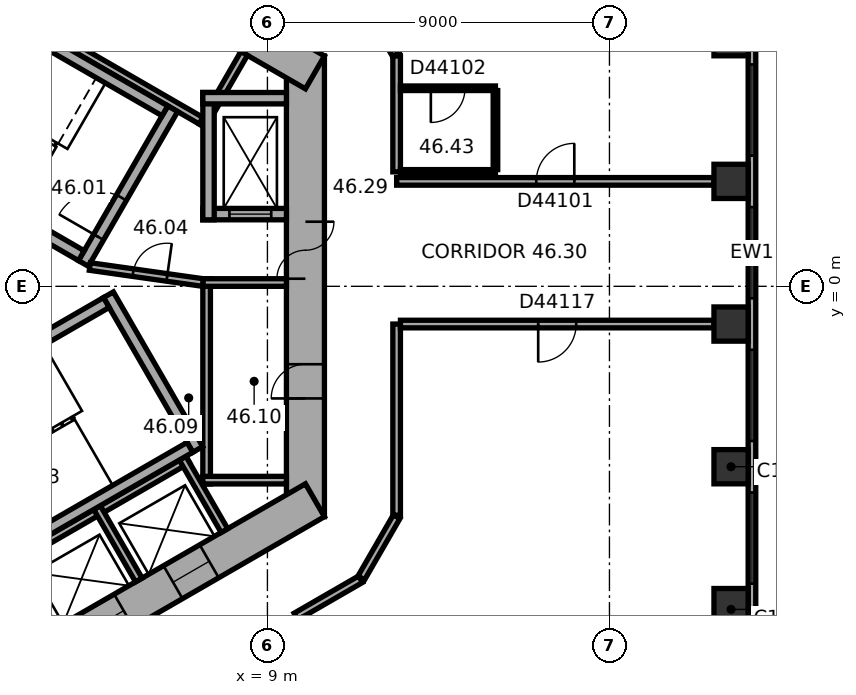
"""IFC4 building model, lengths in metres.
Left out: names, types, materials, properties, quantities, classifications, styles, units other than length and angle.
Written with IfcOpenShell. Run it as: python <this file> out.ifc"""

import sys

from ifc_helpers import new_model, si_unit, direction, frame, frame_2d, origin, origin_2d, place, context, subcontext, project, spatial, rectangle, extrude, element, fill, save


model = new_model("IFC4")
c1 = context("Model", 3, precision=1e-05, world=origin(), true_north=direction((0.0, 1.0)))
c2 = subcontext(c1, "Body", "Model", "MODEL_VIEW")
j1 = project(units=[si_unit("LENGTHUNIT", "METRE"), si_unit("PLANEANGLEUNIT", "RADIAN")], contexts=[c1])
p1 = place(None, origin())
s1 = spatial("IfcSite", under=j1, at=p1, CompositionType="ELEMENT")
p2 = place(p1, origin())
s2 = spatial("IfcBuilding", under=s1, at=p2, CompositionType="ELEMENT")
p3 = place(p2, frame((0.0, 0.0, 187.3)))
s3 = spatial("IfcBuildingStorey", under=s2, at=p3, CompositionType="ELEMENT", Elevation=187.3)
p4 = place(p3, frame((21.2, -8.501, 0.0), z_axis=(0.0, 0.0, 1.0), x_axis=(0.0, 1.0, 0.0)))
e1 = element("IfcColumn", 1, at=p4, inside=s3, PredefinedType="COLUMN", context=c2, shape_type="SweptSolid", body=[
    extrude(rectangle(XDim=1.1, YDim=0.9, at=origin_2d()), origin(), (0.0, 0.0, 1.0), 3.7),
])
for number, where, z_axis, x_axis in (
    (2, (21.2, -4.747, 0.0), (0.0, 0.0, 1.0), (0.0, 1.0, 0.0)),
    (3, (21.2, -0.993, 0.0), (0.0, 0.0, 1.0), (0.0, 1.0, 0.0)),
    (4, (21.2, 2.761, 0.0), (0.0, 0.0, 1.0), (0.0, 1.0, 0.0)),
    (5, (21.2, 6.515, 0.0), (0.0, 0.0, 1.0), (0.0, 1.0, 0.0)),
):
    element("IfcColumn", number, at=place(p3, frame(where, z_axis=z_axis, x_axis=x_axis)), inside=s3, PredefinedType="COLUMN", context=c2, shape_type="SweptSolid", body=[
        extrude(rectangle(XDim=0.9, YDim=0.9, at=origin_2d()), origin(), (0.0, 0.0, 1.0), 3.7),
    ])
p5 = place(p3, frame((10.0, -6.062, 0.0), z_axis=(0.0, 0.0, 1.0), x_axis=(0.0, 1.0, 0.0)))
e6 = element("IfcWall", 6, at=p5, inside=s3, PredefinedType="SHEAR", context=c2, shape_type="SweptSolid", body=[
    extrude(rectangle(XDim=12.125, YDim=1.0, at=frame_2d((6.062, 0.0))), origin(), (0.0, 0.0, 1.0), 3.7),
])
p6 = place(p5, frame((6.262, 0.0, 0.0)))
e7 = element("IfcOpeningElement", 7, at=p6, cuts=e6, PredefinedType="OPENING", context=c2, shape_type="SweptSolid", body=[
    extrude(rectangle(XDim=1.5, YDim=2.1, at=frame_2d((0.75, 1.05))), frame((0.0, 0.51, 0.0), z_axis=(0.0, -1.0, 0.0), x_axis=(1.0, 0.0, 0.0)), (0.0, 0.0, 1.0), 1.02),
])
p7 = place(p5, frame((3.112, 0.0, 0.0)))
e8 = element("IfcOpeningElement", 8, at=p7, cuts=e6, PredefinedType="OPENING", context=c2, shape_type="SweptSolid", body=[
    extrude(rectangle(XDim=0.9, YDim=2.1, at=frame_2d((0.45, 1.05))), frame((0.0, 0.51, 0.0), z_axis=(0.0, -1.0, 0.0), x_axis=(1.0, 0.0, 0.0)), (0.0, 0.0, 1.0), 1.02),
])
p8 = place(p3, frame((10.25, 5.629, 0.0), z_axis=(0.0, 0.0, 1.0), x_axis=(-0.866022616891, 0.50000482701, 0.0)))
e9 = element("IfcWall", 9, at=p8, inside=s3, PredefinedType="SHEAR", context=c2, shape_type="SweptSolid", body=[
    extrude(rectangle(XDim=12.125, YDim=1.0, at=frame_2d((6.062, 0.0))), origin(), (0.0, 0.0, 1.0), 3.7),
])
p9 = place(p8, frame((5.312, 0.0, 0.0)))
e10 = element("IfcOpeningElement", 10, at=p9, cuts=e9, PredefinedType="OPENING", context=c2, shape_type="SweptSolid", body=[
    extrude(rectangle(XDim=0.9, YDim=2.1, at=frame_2d((0.45, 1.05))), frame((0.0, 0.51, 0.0), z_axis=(0.0, -1.0, 0.0), x_axis=(1.0, 0.0, 0.0)), (0.0, 0.0, 1.0), 1.02),
])
p10 = place(p3, frame((-0.25, -11.691, 0.0), z_axis=(0.0, 0.0, 1.0), x_axis=(0.866022616891, 0.50000482701, 0.0)))
e11 = element("IfcWall", 11, at=p10, inside=s3, PredefinedType="SHEAR", context=c2, shape_type="SweptSolid", body=[
    extrude(rectangle(XDim=12.125, YDim=1.0, at=frame_2d((6.062, 0.0))), origin(), (0.0, 0.0, 1.0), 3.7),
])
p11 = place(p10, frame((2.612, 0.0, 0.0)))
e12 = element("IfcOpeningElement", 12, at=p11, cuts=e11, PredefinedType="OPENING", context=c2, shape_type="SweptSolid", body=[
    extrude(rectangle(XDim=1.1, YDim=2.1, at=frame_2d((0.55, 1.05))), frame((0.0, 0.51, 0.0), z_axis=(0.0, -1.0, 0.0), x_axis=(1.0, 0.0, 0.0)), (0.0, 0.0, 1.0), 1.02),
])
p12 = place(p10, frame((5.212, 0.0, 0.0)))
e13 = element("IfcOpeningElement", 13, at=p12, cuts=e11, PredefinedType="OPENING", context=c2, shape_type="SweptSolid", body=[
    extrude(rectangle(XDim=1.1, YDim=2.1, at=frame_2d((0.55, 1.05))), frame((0.0, 0.51, 0.0), z_axis=(0.0, -1.0, 0.0), x_axis=(1.0, 0.0, 0.0)), (0.0, 0.0, 1.0), 1.02),
])
p13 = place(p10, frame((7.812, 0.0, 0.0)))
e14 = element("IfcOpeningElement", 14, at=p13, cuts=e11, PredefinedType="OPENING", context=c2, shape_type="SweptSolid", body=[
    extrude(rectangle(XDim=1.1, YDim=2.1, at=frame_2d((0.55, 1.05))), frame((0.0, 0.51, 0.0), z_axis=(0.0, -1.0, 0.0), x_axis=(1.0, 0.0, 0.0)), (0.0, 0.0, 1.0), 1.02),
])
p14 = place(p3, frame((21.75, -9.138, 0.0), z_axis=(0.0, 0.0, 1.0), x_axis=(0.0, 1.0, 0.0)))
e15 = element("IfcWall", 15, at=p14, inside=s3, PredefinedType="STANDARD", context=c2, shape_type="SweptSolid", body=[
    extrude(rectangle(XDim=20.044, YDim=0.2, at=frame_2d((10.022, 0.0))), origin(), (0.0, 0.0, 1.0), 3.7),
])
p15 = place(p14, frame((1.314, 0.0, 0.9)))
e16 = element("IfcOpeningElement", 16, at=p15, cuts=e15, PredefinedType="OPENING", context=c2, shape_type="SweptSolid", body=[
    extrude(rectangle(XDim=2.4, YDim=2.0, at=frame_2d((1.2, 1.0))), frame((0.0, 0.11, 0.0), z_axis=(0.0, -1.0, 0.0), x_axis=(1.0, 0.0, 0.0)), (0.0, 0.0, 1.0), 0.22),
])
p16 = place(p14, frame((5.069, 0.0, 0.9)))
e17 = element("IfcOpeningElement", 17, at=p16, cuts=e15, PredefinedType="OPENING", context=c2, shape_type="SweptSolid", body=[
    extrude(rectangle(XDim=2.4, YDim=2.0, at=frame_2d((1.2, 1.0))), frame((0.0, 0.11, 0.0), z_axis=(0.0, -1.0, 0.0), x_axis=(1.0, 0.0, 0.0)), (0.0, 0.0, 1.0), 0.22),
])
p17 = place(p14, frame((8.823, 0.0, 0.9)))
e18 = element("IfcOpeningElement", 18, at=p17, cuts=e15, PredefinedType="OPENING", context=c2, shape_type="SweptSolid", body=[
    extrude(rectangle(XDim=2.4, YDim=2.0, at=frame_2d((1.2, 1.0))), frame((0.0, 0.11, 0.0), z_axis=(0.0, -1.0, 0.0), x_axis=(1.0, 0.0, 0.0)), (0.0, 0.0, 1.0), 0.22),
])
p18 = place(p14, frame((12.577, 0.0, 0.9)))
e19 = element("IfcOpeningElement", 19, at=p18, cuts=e15, PredefinedType="OPENING", context=c2, shape_type="SweptSolid", body=[
    extrude(rectangle(XDim=2.4, YDim=2.0, at=frame_2d((1.2, 1.0))), frame((0.0, 0.11, 0.0), z_axis=(0.0, -1.0, 0.0), x_axis=(1.0, 0.0, 0.0)), (0.0, 0.0, 1.0), 0.22),
])
p19 = place(p14, frame((16.331, 0.0, 0.9)))
e20 = element("IfcOpeningElement", 20, at=p19, cuts=e15, PredefinedType="OPENING", context=c2, shape_type="SweptSolid", body=[
    extrude(rectangle(XDim=2.4, YDim=2.0, at=frame_2d((1.2, 1.0))), frame((0.0, 0.11, 0.0), z_axis=(0.0, -1.0, 0.0), x_axis=(1.0, 0.0, 0.0)), (0.0, 0.0, 1.0), 0.22),
])
p20 = place(p3, frame((7.4, -5.2, 0.0), z_axis=(0.0, 0.0, 1.0), x_axis=(0.0, 1.0, 0.0)))
e21 = element("IfcWall", 21, at=p20, inside=s3, PredefinedType="PARTITIONING", context=c2, shape_type="SweptSolid", body=[
    extrude(rectangle(XDim=5.4, YDim=0.2, at=frame_2d((2.7, 0.0))), origin(), (0.0, 0.0, 1.0), 3.42),
])
for number, where, z_axis, x_axis in (
    (22, (7.3, -5.1, 0.0), (0.0, 0.0, 1.0), (1.0, 0.0, 0.0)),
    (23, (7.3, 0.1, 0.0), (0.0, 0.0, 1.0), (1.0, 0.0, 0.0)),
):
    element("IfcWall", number, at=place(p3, frame(where, z_axis=z_axis, x_axis=x_axis)), inside=s3, PredefinedType="PARTITIONING", context=c2, shape_type="SweptSolid", body=[
        extrude(rectangle(XDim=2.2, YDim=0.2, at=frame_2d((1.1, 0.0))), origin(), (0.0, 0.0, 1.0), 3.42),
    ])
p21 = place(p3, frame((7.424, 4.259, 0.0), z_axis=(0.0, 0.0, 1.0), x_axis=(-0.866026010844, 0.49999894854, 0.0)))
e24 = element("IfcWall", 24, at=p21, inside=s3, PredefinedType="PARTITIONING", context=c2, shape_type="SweptSolid", body=[
    extrude(rectangle(XDim=8.0, YDim=0.2, at=frame_2d((4.0, 0.0))), origin(), (0.0, 0.0, 1.0), 3.42),
])
p22 = place(p3, frame((7.287, 4.222, 0.0), z_axis=(0.0, 0.0, 1.0), x_axis=(0.499946605688, 0.86605622881, 0.0)))
e25 = element("IfcWall", 25, at=p22, inside=s3, PredefinedType="PARTITIONING", context=c2, shape_type="SweptSolid", body=[
    extrude(rectangle(XDim=2.2, YDim=0.2, at=frame_2d((1.1, 0.0))), origin(), (0.0, 0.0, 1.0), 3.42),
])
p23 = place(p3, frame((-0.024, -8.559, 0.0), z_axis=(0.0, 0.0, 1.0), x_axis=(0.866026010844, 0.49999894854, 0.0)))
e26 = element("IfcWall", 26, at=p23, inside=s3, PredefinedType="PARTITIONING", context=c2, shape_type="SweptSolid", body=[
    extrude(rectangle(XDim=8.0, YDim=0.2, at=frame_2d((4.0, 0.0))), origin(), (0.0, 0.0, 1.0), 3.42),
])
for number, where, z_axis, x_axis in (
    (27, (2.264, -7.122, 0.0), (0.0, 0.0, 1.0), (0.5, -0.866, 0.0)),
    (28, (4.516, -5.822, 0.0), (0.0, 0.0, 1.0), (0.5, -0.866, 0.0)),
    (29, (6.768, -4.522, 0.0), (0.0, 0.0, 1.0), (0.5, -0.866, 0.0)),
):
    element("IfcWall", number, at=place(p3, frame(where, z_axis=z_axis, x_axis=x_axis)), inside=s3, PredefinedType="PARTITIONING", context=c2, shape_type="SweptSolid", body=[
        extrude(rectangle(XDim=2.2, YDim=0.2, at=frame_2d((1.1, 0.0))), origin(), (0.0, 0.0, 1.0), 3.42),
    ])
p24 = place(p3, frame((4.158, 0.602, 0.0), z_axis=(0.0, 0.0, 1.0), x_axis=(0.499977259774, 0.866038532462, 0.0)))
e30 = element("IfcWall", 30, at=p24, inside=s3, PredefinedType="SHEAR", context=c2, shape_type="SweptSolid", body=[
    extrude(rectangle(XDim=4.7, YDim=0.3, at=frame_2d((2.35, 0.0))), origin(), (0.0, 0.0, 1.0), 3.42),
])
p25 = place(p24, frame((0.8, 0.0, 0.0)))
e31 = element("IfcOpeningElement", 31, at=p25, cuts=e30, PredefinedType="OPENING", context=c2, shape_type="SweptSolid", body=[
    extrude(rectangle(XDim=1.2, YDim=2.1, at=frame_2d((0.6, 1.05))), frame((0.0, 0.16, 0.0), z_axis=(0.0, -1.0, 0.0), x_axis=(1.0, 0.0, 0.0)), (0.0, 0.0, 1.0), 0.32),
])
for number, where, z_axis, x_axis in (
    (32, (4.103, 0.807, 0.0), (0.0, 0.0, 1.0), (-0.866, 0.5, 0.0)),
    (33, (6.303, 4.617, 0.0), (0.0, 0.0, 1.0), (-0.866, 0.5, 0.0)),
):
    element("IfcWall", number, at=place(p3, frame(where, z_axis=z_axis, x_axis=x_axis)), inside=s3, PredefinedType="SHEAR", context=c2, shape_type="SweptSolid", body=[
        extrude(rectangle(XDim=7.06, YDim=0.3, at=frame_2d((3.53, 0.0))), origin(), (0.0, 0.0, 1.0), 3.42),
    ])
p26 = place(p3, frame((4.816, -0.222, 0.0), z_axis=(0.0, 0.0, 1.0), x_axis=(0.499977259774, -0.866038532462, 0.0)))
e34 = element("IfcWall", 34, at=p26, inside=s3, PredefinedType="SHEAR", context=c2, shape_type="SweptSolid", body=[
    extrude(rectangle(XDim=4.7, YDim=0.3, at=frame_2d((2.35, 0.0))), origin(), (0.0, 0.0, 1.0), 3.42),
])
for number, where, z_axis, x_axis in (
    (35, (-1.353, -3.957, 0.0), (0.0, 0.0, 1.0), (0.866, 0.5, 0.0)),
    (36, (0.847, -7.767, 0.0), (0.0, 0.0, 1.0), (0.866, 0.5, 0.0)),
):
    element("IfcWall", number, at=place(p3, frame(where, z_axis=z_axis, x_axis=x_axis)), inside=s3, PredefinedType="SHEAR", context=c2, shape_type="SweptSolid", body=[
        extrude(rectangle(XDim=7.06, YDim=0.3, at=frame_2d((3.53, 0.0))), origin(), (0.0, 0.0, 1.0), 3.42),
    ])
p27 = place(p3, frame((7.3, 1.9, 0.0), z_axis=(0.0, 0.0, 1.0), x_axis=(1.0, 0.0, 0.0)))
e37 = element("IfcWall", 37, at=p27, inside=s3, PredefinedType="SHEAR", context=c2, shape_type="SweptSolid", body=[
    extrude(rectangle(XDim=2.2, YDim=0.3, at=frame_2d((1.1, 0.0))), origin(), (0.0, 0.0, 1.0), 3.42),
])
p28 = place(p27, frame((0.7, 0.0, 0.0)))
e38 = element("IfcOpeningElement", 38, at=p28, cuts=e37, PredefinedType="OPENING", context=c2, shape_type="SweptSolid", body=[
    extrude(rectangle(XDim=1.1, YDim=2.1, at=frame_2d((0.55, 1.05))), frame((0.0, 0.16, 0.0), z_axis=(0.0, -1.0, 0.0), x_axis=(1.0, 0.0, 0.0)), (0.0, 0.0, 1.0), 0.32),
])
p29 = place(p3, frame((7.45, 1.75, 0.0), z_axis=(0.0, 0.0, 1.0), x_axis=(0.0, 1.0, 0.0)))
e39 = element("IfcWall", 39, at=p29, inside=s3, PredefinedType="SHEAR", context=c2, shape_type="SweptSolid", body=[
    extrude(rectangle(XDim=3.35, YDim=0.3, at=frame_2d((1.675, 0.0))), origin(), (0.0, 0.0, 1.0), 3.42),
])
p30 = place(p3, frame((7.3, 4.95, 0.0), z_axis=(0.0, 0.0, 1.0), x_axis=(1.0, 0.0, 0.0)))
e40 = element("IfcWall", 40, at=p30, inside=s3, PredefinedType="SHEAR", context=c2, shape_type="SweptSolid", body=[
    extrude(rectangle(XDim=2.2, YDim=0.3, at=frame_2d((1.1, 0.0))), origin(), (0.0, 0.0, 1.0), 3.42),
])
p31 = place(p3, frame((4.327, 0.521, 0.0), z_axis=(0.0, 0.0, 1.0), x_axis=(0.990124376366, -0.14019172346, 0.0)))
e41 = element("IfcWall", 41, at=p31, inside=s3, PredefinedType="PARTITIONING", context=c2, shape_type="SweptSolid", body=[
    extrude(rectangle(XDim=3.002, YDim=0.2, at=frame_2d((1.501, 0.0))), origin(), (0.0, 0.0, 1.0), 3.42),
])
p32 = place(p31, frame((1.15, 0.0, 0.0)))
e42 = element("IfcOpeningElement", 42, at=p32, cuts=e41, PredefinedType="OPENING", context=c2, shape_type="SweptSolid", body=[
    extrude(rectangle(XDim=0.9, YDim=2.1, at=frame_2d((0.45, 1.05))), frame((0.0, 0.11, 0.0), z_axis=(0.0, -1.0, 0.0), x_axis=(1.0, 0.0, 0.0)), (0.0, 0.0, 1.0), 0.22),
])
p33 = place(p3, frame((9.752, -8.688, 0.0), z_axis=(0.0, 0.0, 1.0), x_axis=(0.865974105138, 0.500088841337, 0.0)))
e43 = element("IfcWall", 43, at=p33, inside=s3, PredefinedType="PARTITIONING", context=c2, shape_type="SweptSolid", body=[
    extrude(rectangle(XDim=1.961, YDim=0.2, at=frame_2d((0.98, 0.0))), origin(), (0.0, 0.0, 1.0), 3.42),
])
for number, where, z_axis, x_axis in (
    (44, (11.47, -7.673, 0.0), (0.0, 0.0, 1.0), (0.5, 0.866, 0.0)),
    (45, (12.38, 6.097, 0.0), (0.0, 0.0, 1.0), (-0.5, 0.866, 0.0)),
):
    element("IfcWall", number, at=place(p3, frame(where, z_axis=z_axis, x_axis=x_axis)), inside=s3, PredefinedType="PARTITIONING", context=c2, shape_type="SweptSolid", body=[
        extrude(rectangle(XDim=1.86, YDim=0.2, at=frame_2d((0.93, 0.0))), origin(), (0.0, 0.0, 1.0), 3.42),
    ])
p34 = place(p3, frame((12.4, -6.022, 0.0), z_axis=(0.0, 0.0, 1.0), x_axis=(0.0, 1.0, 0.0)))
e46 = element("IfcWall", 46, at=p34, inside=s3, PredefinedType="PARTITIONING", context=c2, shape_type="SweptSolid", body=[
    extrude(rectangle(XDim=5.029, YDim=0.2, at=frame_2d((2.515, 0.0))), origin(), (0.0, 0.0, 1.0), 3.42),
])
p35 = place(p3, frame((12.4, 3.011, 0.0), z_axis=(0.0, 0.0, 1.0), x_axis=(0.0, 1.0, 0.0)))
e47 = element("IfcWall", 47, at=p35, inside=s3, PredefinedType="PARTITIONING", context=c2, shape_type="SweptSolid", body=[
    extrude(rectangle(XDim=3.051, YDim=0.2, at=frame_2d((1.525, 0.0))), origin(), (0.0, 0.0, 1.0), 3.42),
])
p36 = place(p3, frame((12.5, -0.993, 0.0), z_axis=(0.0, 0.0, 1.0), x_axis=(1.0, 0.0, 0.0)))
e48 = element("IfcWall", 48, at=p36, inside=s3, PredefinedType="PARTITIONING", context=c2, shape_type="SweptSolid", body=[
    extrude(rectangle(XDim=8.25, YDim=0.2, at=frame_2d((4.125, 0.0))), origin(), (0.0, 0.0, 1.0), 2.87),
])
p37 = place(p36, frame((3.625, 0.0, 0.0)))
e49 = element("IfcOpeningElement", 49, at=p37, cuts=e48, PredefinedType="OPENING", context=c2, shape_type="SweptSolid", body=[
    extrude(rectangle(XDim=1.0, YDim=2.1, at=frame_2d((0.5, 1.05))), frame((0.0, 0.11, 0.0), z_axis=(0.0, -1.0, 0.0), x_axis=(1.0, 0.0, 0.0)), (0.0, 0.0, 1.0), 0.22),
])
p38 = place(p3, frame((12.5, 5.211, 0.0), z_axis=(0.0, 0.0, 1.0), x_axis=(1.0, 0.0, 0.0)))
e50 = element("IfcWall", 50, at=p38, inside=s3, PredefinedType="PARTITIONING", context=c2, shape_type="SweptSolid", body=[
    extrude(rectangle(XDim=2.5, YDim=0.12, at=frame_2d((1.25, 0.0))), origin(), (0.0, 0.0, 1.0), 3.42),
])
p39 = place(p38, frame((0.8, 0.0, 0.0)))
e51 = element("IfcOpeningElement", 51, at=p39, cuts=e50, PredefinedType="OPENING", context=c2, shape_type="SweptSolid", body=[
    extrude(rectangle(XDim=0.9, YDim=2.1, at=frame_2d((0.45, 1.05))), frame((0.0, 0.07, 0.0), z_axis=(0.0, -1.0, 0.0), x_axis=(1.0, 0.0, 0.0)), (0.0, 0.0, 1.0), 0.14),
])
p40 = place(p3, frame((15.0, 3.011, 0.0), z_axis=(0.0, 0.0, 1.0), x_axis=(-1.0, 0.0, 0.0)))
e52 = element("IfcWall", 52, at=p40, inside=s3, PredefinedType="PARTITIONING", context=c2, shape_type="SweptSolid", body=[
    extrude(rectangle(XDim=2.5, YDim=0.12, at=frame_2d((1.25, 0.0))), origin(), (0.0, 0.0, 1.0), 3.42),
])
p41 = place(p3, frame((15.0, 5.151, 0.0), z_axis=(0.0, 0.0, 1.0), x_axis=(0.0, -1.0, 0.0)))
e53 = element("IfcWall", 53, at=p41, inside=s3, PredefinedType="PARTITIONING", context=c2, shape_type="SweptSolid", body=[
    extrude(rectangle(XDim=2.08, YDim=0.12, at=frame_2d((1.04, 0.0))), origin(), (0.0, 0.0, 1.0), 3.42),
])
p42 = place(p3, frame((20.75, 2.761, 0.0), z_axis=(0.0, 0.0, 1.0), x_axis=(-1.0, 0.0, 0.0)))
e54 = element("IfcWall", 54, at=p42, inside=s3, PredefinedType="PARTITIONING", context=c2, shape_type="SweptSolid", body=[
    extrude(rectangle(XDim=8.35, YDim=0.2, at=frame_2d((4.175, 0.0))), origin(), (0.0, 0.0, 1.0), 3.42),
])
p43 = place(p42, frame((3.675, 0.0, 0.0)))
e55 = element("IfcOpeningElement", 55, at=p43, cuts=e54, PredefinedType="OPENING", context=c2, shape_type="SweptSolid", body=[
    extrude(rectangle(XDim=1.0, YDim=2.1, at=frame_2d((0.5, 1.05))), frame((0.0, 0.11, 0.0), z_axis=(0.0, -1.0, 0.0), x_axis=(1.0, 0.0, 0.0)), (0.0, 0.0, 1.0), 0.22),
])
p44 = place(p15, origin())
e56 = element("IfcWindow", 56, at=p44, inside=s3, PartitioningType="SINGLE_PANEL", PredefinedType="WINDOW", context=c2, shape_type="SweptSolid", body=[
    extrude(rectangle(XDim=2.4, YDim=2.0, at=frame_2d((1.2, 1.0))), frame((0.0, 0.03, 0.0), z_axis=(0.0, -1.0, 0.0), x_axis=(1.0, 0.0, 0.0)), (0.0, 0.0, 1.0), 0.06),
])
fill(e16, e56)
p45 = place(p16, origin())
e57 = element("IfcWindow", 57, at=p45, inside=s3, PartitioningType="SINGLE_PANEL", PredefinedType="WINDOW", context=c2, shape_type="SweptSolid", body=[
    extrude(rectangle(XDim=2.4, YDim=2.0, at=frame_2d((1.2, 1.0))), frame((0.0, 0.03, 0.0), z_axis=(0.0, -1.0, 0.0), x_axis=(1.0, 0.0, 0.0)), (0.0, 0.0, 1.0), 0.06),
])
fill(e17, e57)
p46 = place(p17, origin())
e58 = element("IfcWindow", 58, at=p46, inside=s3, PartitioningType="SINGLE_PANEL", PredefinedType="WINDOW", context=c2, shape_type="SweptSolid", body=[
    extrude(rectangle(XDim=2.4, YDim=2.0, at=frame_2d((1.2, 1.0))), frame((0.0, 0.03, 0.0), z_axis=(0.0, -1.0, 0.0), x_axis=(1.0, 0.0, 0.0)), (0.0, 0.0, 1.0), 0.06),
])
fill(e18, e58)
p47 = place(p18, origin())
e59 = element("IfcWindow", 59, at=p47, inside=s3, PartitioningType="SINGLE_PANEL", PredefinedType="WINDOW", context=c2, shape_type="SweptSolid", body=[
    extrude(rectangle(XDim=2.4, YDim=2.0, at=frame_2d((1.2, 1.0))), frame((0.0, 0.03, 0.0), z_axis=(0.0, -1.0, 0.0), x_axis=(1.0, 0.0, 0.0)), (0.0, 0.0, 1.0), 0.06),
])
fill(e19, e59)
p48 = place(p6, origin())
e60 = element("IfcDoor", 60, at=p48, inside=s3, OperationType="DOUBLE_DOOR_SINGLE_SWING", PredefinedType="DOOR", context=c2, shape_type="SweptSolid", body=[
    extrude(rectangle(XDim=1.5, YDim=2.1, at=frame_2d((0.75, 1.05))), frame((0.0, 0.025, 0.0), z_axis=(0.0, -1.0, 0.0), x_axis=(1.0, 0.0, 0.0)), (0.0, 0.0, 1.0), 0.05),
])
fill(e7, e60)
p49 = place(p25, origin())
e61 = element("IfcDoor", 61, at=p49, inside=s3, OperationType="SINGLE_SWING_RIGHT", PredefinedType="DOOR", context=c2, shape_type="SweptSolid", body=[
    extrude(rectangle(XDim=1.2, YDim=2.1, at=frame_2d((0.6, 1.05))), frame((0.0, 0.025, 0.0), z_axis=(0.0, -1.0, 0.0), x_axis=(1.0, 0.0, 0.0)), (0.0, 0.0, 1.0), 0.05),
])
fill(e31, e61)
p50 = place(p32, origin())
e62 = element("IfcDoor", 62, at=p50, inside=s3, OperationType="SINGLE_SWING_LEFT", PredefinedType="DOOR", context=c2, shape_type="SweptSolid", body=[
    extrude(rectangle(XDim=0.9, YDim=2.1, at=frame_2d((0.45, 1.05))), frame((0.0, 0.025, 0.0), z_axis=(0.0, -1.0, 0.0), x_axis=(1.0, 0.0, 0.0)), (0.0, 0.0, 1.0), 0.05),
])
fill(e42, e62)
p51 = place(p7, origin())
e63 = element("IfcDoor", 63, at=p51, inside=s3, OperationType="SINGLE_SWING_LEFT", PredefinedType="DOOR", context=c2, shape_type="SweptSolid", body=[
    extrude(rectangle(XDim=0.9, YDim=2.1, at=frame_2d((0.45, 1.05))), frame((0.0, 0.025, 0.0), z_axis=(0.0, -1.0, 0.0), x_axis=(1.0, 0.0, 0.0)), (0.0, 0.0, 1.0), 0.05),
])
fill(e8, e63)
p52 = place(p28, origin())
e64 = element("IfcDoor", 64, at=p52, inside=s3, OperationType="DOUBLE_DOOR_SLIDING", PredefinedType="DOOR", context=c2, shape_type="SweptSolid", body=[
    extrude(rectangle(XDim=1.1, YDim=2.1, at=frame_2d((0.55, 1.05))), frame((0.0, 0.025, 0.0), z_axis=(0.0, -1.0, 0.0), x_axis=(1.0, 0.0, 0.0)), (0.0, 0.0, 1.0), 0.05),
])
fill(e38, e64)
p53 = place(p12, origin())
e65 = element("IfcDoor", 65, at=p53, inside=s3, OperationType="DOUBLE_DOOR_SLIDING", PredefinedType="DOOR", context=c2, shape_type="SweptSolid", body=[
    extrude(rectangle(XDim=1.1, YDim=2.1, at=frame_2d((0.55, 1.05))), frame((0.0, 0.025, 0.0), z_axis=(0.0, -1.0, 0.0), x_axis=(1.0, 0.0, 0.0)), (0.0, 0.0, 1.0), 0.05),
])
fill(e13, e65)
p54 = place(p13, origin())
e66 = element("IfcDoor", 66, at=p54, inside=s3, OperationType="DOUBLE_DOOR_SLIDING", PredefinedType="DOOR", context=c2, shape_type="SweptSolid", body=[
    extrude(rectangle(XDim=1.1, YDim=2.1, at=frame_2d((0.55, 1.05))), frame((0.0, 0.025, 0.0), z_axis=(0.0, -1.0, 0.0), x_axis=(1.0, 0.0, 0.0)), (0.0, 0.0, 1.0), 0.05),
])
fill(e14, e66)
p55 = place(p43, origin())
e67 = element("IfcDoor", 67, at=p55, inside=s3, OperationType="SINGLE_SWING_LEFT", PredefinedType="DOOR", context=c2, shape_type="SweptSolid", body=[
    extrude(rectangle(XDim=1.0, YDim=2.1, at=frame_2d((0.5, 1.05))), frame((0.0, 0.025, 0.0), z_axis=(0.0, -1.0, 0.0), x_axis=(1.0, 0.0, 0.0)), (0.0, 0.0, 1.0), 0.05),
])
fill(e55, e67)
p56 = place(p39, origin())
e68 = element("IfcDoor", 68, at=p56, inside=s3, OperationType="SINGLE_SWING_LEFT", PredefinedType="DOOR", context=c2, shape_type="SweptSolid", body=[
    extrude(rectangle(XDim=0.9, YDim=2.1, at=frame_2d((0.45, 1.05))), frame((0.0, 0.025, 0.0), z_axis=(0.0, -1.0, 0.0), x_axis=(1.0, 0.0, 0.0)), (0.0, 0.0, 1.0), 0.05),
])
fill(e51, e68)
p57 = place(p37, origin())
e69 = element("IfcDoor", 69, at=p57, inside=s3, OperationType="SINGLE_SWING_LEFT", PredefinedType="DOOR", context=c2, shape_type="SweptSolid", body=[
    extrude(rectangle(XDim=1.0, YDim=2.1, at=frame_2d((0.5, 1.05))), frame((0.0, 0.025, 0.0), z_axis=(0.0, -1.0, 0.0), x_axis=(1.0, 0.0, 0.0)), (0.0, 0.0, 1.0), 0.05),
])
fill(e49, e69)
save(model, sys.argv[1])
